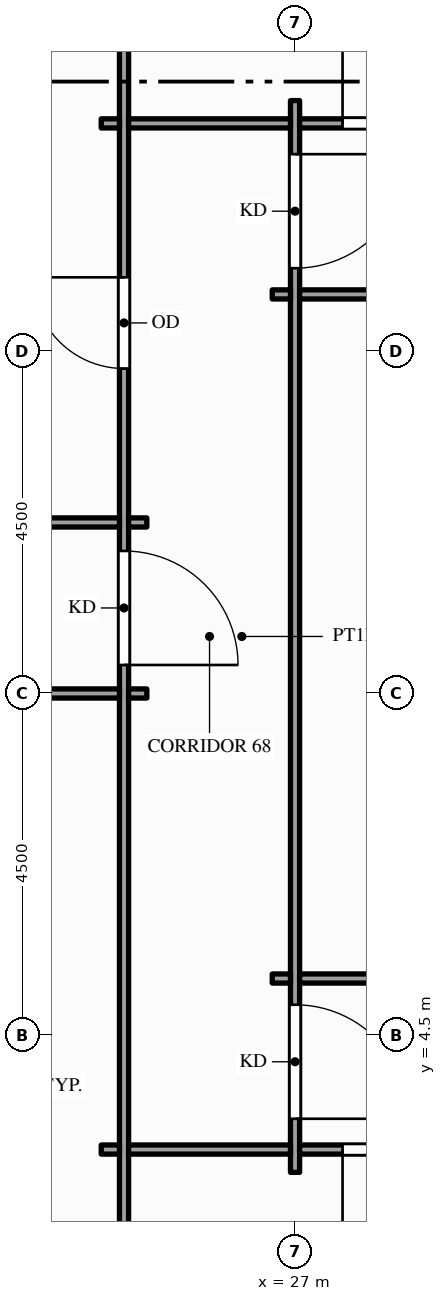
"""IFC4 building model, lengths in metres.
Left out: names, types, materials, properties, quantities, classifications, styles, units other than length and angle.
Written with IfcOpenShell. Run it as: python <this file> out.ifc"""

import sys

from ifc_helpers import new_model, si_unit, direction, frame, frame_2d, origin, place, context, subcontext, project, spatial, rectangle, extrude, element, fill, save


model = new_model("IFC4")
c1 = context("Model", 3, precision=1e-05, world=origin(), true_north=direction((0.0, 1.0)))
c2 = subcontext(c1, "Body", "Model", "MODEL_VIEW")
j1 = project(units=[si_unit("LENGTHUNIT", "METRE"), si_unit("PLANEANGLEUNIT", "RADIAN")], contexts=[c1])
p1 = place(None, origin())
s1 = spatial("IfcSite", under=j1, at=p1, CompositionType="ELEMENT")
p2 = place(p1, origin())
s2 = spatial("IfcBuilding", under=s1, at=p2, CompositionType="ELEMENT")
p3 = place(p2, frame((0.0, 0.0, 199.0)))
s3 = spatial("IfcBuildingStorey", under=s2, at=p3, CompositionType="ELEMENT", Elevation=199.0)
p4 = place(p3, frame((24.75, -1.35, 0.0), z_axis=(0.0, 0.0, 1.0), x_axis=(0.0, 1.0, 0.0)))
e1 = element("IfcWall", 1, at=p4, inside=s3, PredefinedType="PARTITIONING", context=c2, shape_type="SweptSolid", body=[
    extrude(rectangle(XDim=24.101, YDim=0.12, at=frame_2d((12.05, 0.0))), origin(), (0.0, 0.0, 1.0), 2.76),
])
p5 = place(p4, frame((10.725, 0.0, 0.0)))
e2 = element("IfcOpeningElement", 2, at=p5, cuts=e1, PredefinedType="OPENING", context=c2, shape_type="SweptSolid", body=[
    extrude(rectangle(XDim=1.5, YDim=2.1, at=frame_2d((0.75, 1.05))), frame((0.0, 0.07, 0.0), z_axis=(0.0, -1.0, 0.0), x_axis=(1.0, 0.0, 0.0)), (0.0, 0.0, 1.0), 0.14),
])
p6 = place(p4, frame((14.625, 0.0, 0.0)))
e3 = element("IfcOpeningElement", 3, at=p6, cuts=e1, PredefinedType="OPENING", context=c2, shape_type="SweptSolid", body=[
    extrude(rectangle(XDim=1.2, YDim=2.1, at=frame_2d((0.6, 1.05))), frame((0.0, 0.07, 0.0), z_axis=(0.0, -1.0, 0.0), x_axis=(1.0, 0.0, 0.0)), (0.0, 0.0, 1.0), 0.14),
])
p7 = place(p3, frame((27.0, 2.7, 0.0), z_axis=(0.0, 0.0, 1.0), x_axis=(0.0, 1.0, 0.0)))
e4 = element("IfcWall", 4, at=p7, inside=s3, PredefinedType="PARTITIONING", context=c2, shape_type="SweptSolid", body=[
    extrude(rectangle(XDim=14.1, YDim=0.12, at=frame_2d((7.05, 0.0))), origin(), (0.0, 0.0, 1.0), 2.87),
])
p8 = place(p7, frame((0.705, 0.0, 0.0)))
e5 = element("IfcOpeningElement", 5, at=p8, cuts=e4, PredefinedType="OPENING", context=c2, shape_type="SweptSolid", body=[
    extrude(rectangle(XDim=1.5, YDim=2.1, at=frame_2d((0.75, 1.05))), frame((0.0, 0.07, 0.0), z_axis=(0.0, -1.0, 0.0), x_axis=(1.0, 0.0, 0.0)), (0.0, 0.0, 1.0), 0.14),
])
p9 = place(p7, frame((11.895, 0.0, 0.0)))
e6 = element("IfcOpeningElement", 6, at=p9, cuts=e4, PredefinedType="OPENING", context=c2, shape_type="SweptSolid", body=[
    extrude(rectangle(XDim=1.5, YDim=2.1, at=frame_2d((0.75, 1.05))), frame((0.0, 0.07, 0.0), z_axis=(0.0, -1.0, 0.0), x_axis=(1.0, 0.0, 0.0)), (0.0, 0.0, 1.0), 0.14),
])
p10 = place(p3, frame((24.45, 3.0, 0.0), z_axis=(0.0, 0.0, 1.0), x_axis=(1.0, 0.0, 0.0)))
e7 = element("IfcWall", 7, at=p10, inside=s3, PredefinedType="PARTITIONING", context=c2, shape_type="SweptSolid", body=[
    extrude(rectangle(XDim=0.24, YDim=0.12, at=frame_2d((0.12, 0.0))), origin(), (0.0, 0.0, 1.0), 2.76),
])
p11 = place(p3, frame((24.81, 3.0, 0.0), z_axis=(0.0, 0.0, 1.0), x_axis=(1.0, 0.0, 0.0)))
e8 = element("IfcWall", 8, at=p11, inside=s3, PredefinedType="PARTITIONING", context=c2, shape_type="SweptSolid", body=[
    extrude(rectangle(XDim=2.13, YDim=0.12, at=frame_2d((1.065, 0.0))), origin(), (0.0, 0.0, 1.0), 2.76),
])
p12 = place(p3, frame((27.06, 3.0, 0.0), z_axis=(0.0, 0.0, 1.0), x_axis=(1.0, 0.0, 0.0)))
e9 = element("IfcWall", 9, at=p12, inside=s3, PredefinedType="PARTITIONING", context=c2, shape_type="SweptSolid", body=[
    extrude(rectangle(XDim=2.13, YDim=0.12, at=frame_2d((1.065, 0.0))), origin(), (0.0, 0.0, 1.0), 2.87),
])
p13 = place(p12, frame((0.565, 0.0, 0.0)))
e10 = element("IfcOpeningElement", 10, at=p13, cuts=e9, PredefinedType="OPENING", context=c2, shape_type="SweptSolid", body=[
    extrude(rectangle(XDim=1.0, YDim=2.1, at=frame_2d((0.5, 1.05))), frame((0.0, 0.07, 0.0), z_axis=(0.0, -1.0, 0.0), x_axis=(1.0, 0.0, 0.0)), (0.0, 0.0, 1.0), 0.14),
])
p14 = place(p3, frame((26.7, 5.25, 0.0), z_axis=(0.0, 0.0, 1.0), x_axis=(1.0, 0.0, 0.0)))
e11 = element("IfcWall", 11, at=p14, inside=s3, PredefinedType="PARTITIONING", context=c2, shape_type="SweptSolid", body=[
    extrude(rectangle(XDim=0.24, YDim=0.12, at=frame_2d((0.12, 0.0))), origin(), (0.0, 0.0, 1.0), 2.87),
])
p15 = place(p3, frame((27.06, 5.25, 0.0), z_axis=(0.0, 0.0, 1.0), x_axis=(1.0, 0.0, 0.0)))
e12 = element("IfcWall", 12, at=p15, inside=s3, PredefinedType="PARTITIONING", context=c2, shape_type="SweptSolid", body=[
    extrude(rectangle(XDim=8.88, YDim=0.12, at=frame_2d((4.44, 0.0))), origin(), (0.0, 0.0, 1.0), 2.87),
])
p16 = place(p15, frame((3.54, 0.0, 0.0)))
e13 = element("IfcOpeningElement", 13, at=p16, cuts=e12, PredefinedType="OPENING", context=c2, shape_type="SweptSolid", body=[
    extrude(rectangle(XDim=1.8, YDim=2.1, at=frame_2d((0.9, 1.05))), frame((0.0, 0.07, 0.0), z_axis=(0.0, -1.0, 0.0), x_axis=(1.0, 0.0, 0.0)), (0.0, 0.0, 1.0), 0.14),
])
p17 = place(p3, frame((18.06, 9.0, 0.0), z_axis=(0.0, 0.0, 1.0), x_axis=(1.0, 0.0, 0.0)))
e14 = element("IfcWall", 14, at=p17, inside=s3, PredefinedType="PARTITIONING", context=c2, shape_type="SweptSolid", body=[
    extrude(rectangle(XDim=6.63, YDim=0.12, at=frame_2d((3.315, 0.0))), origin(), (0.0, 0.0, 1.0), 2.76),
])
p18 = place(p17, frame((2.715, 0.0, 0.0)))
e15 = element("IfcOpeningElement", 15, at=p18, cuts=e14, PredefinedType="OPENING", context=c2, shape_type="SweptSolid", body=[
    extrude(rectangle(XDim=1.2, YDim=2.1, at=frame_2d((0.6, 1.05))), frame((0.0, 0.07, 0.0), z_axis=(0.0, -1.0, 0.0), x_axis=(1.0, 0.0, 0.0)), (0.0, 0.0, 1.0), 0.14),
])
p19 = place(p3, frame((24.81, 9.0, 0.0), z_axis=(0.0, 0.0, 1.0), x_axis=(1.0, 0.0, 0.0)))
e16 = element("IfcWall", 16, at=p19, inside=s3, PredefinedType="PARTITIONING", context=c2, shape_type="SweptSolid", body=[
    extrude(rectangle(XDim=0.24, YDim=0.12, at=frame_2d((0.12, 0.0))), origin(), (0.0, 0.0, 1.0), 2.76),
])
p20 = place(p3, frame((11.31, 11.25, 0.0), z_axis=(0.0, 0.0, 1.0), x_axis=(1.0, 0.0, 0.0)))
e17 = element("IfcWall", 17, at=p20, inside=s3, PredefinedType="PARTITIONING", context=c2, shape_type="SweptSolid", body=[
    extrude(rectangle(XDim=13.38, YDim=0.12, at=frame_2d((6.69, 0.0))), origin(), (0.0, 0.0, 1.0), 2.76),
])
p21 = place(p20, frame((3.54, 0.0, 0.0)))
e18 = element("IfcOpeningElement", 18, at=p21, cuts=e17, PredefinedType="OPENING", context=c2, shape_type="SweptSolid", body=[
    extrude(rectangle(XDim=1.8, YDim=2.1, at=frame_2d((0.9, 1.05))), frame((0.0, 0.07, 0.0), z_axis=(0.0, -1.0, 0.0), x_axis=(1.0, 0.0, 0.0)), (0.0, 0.0, 1.0), 0.14),
])
p22 = place(p3, frame((24.81, 11.25, 0.0), z_axis=(0.0, 0.0, 1.0), x_axis=(1.0, 0.0, 0.0)))
e19 = element("IfcWall", 19, at=p22, inside=s3, PredefinedType="PARTITIONING", context=c2, shape_type="SweptSolid", body=[
    extrude(rectangle(XDim=0.24, YDim=0.12, at=frame_2d((0.12, 0.0))), origin(), (0.0, 0.0, 1.0), 2.76),
])
p23 = place(p3, frame((26.7, 14.25, 0.0), z_axis=(0.0, 0.0, 1.0), x_axis=(1.0, 0.0, 0.0)))
e20 = element("IfcWall", 20, at=p23, inside=s3, PredefinedType="PARTITIONING", context=c2, shape_type="SweptSolid", body=[
    extrude(rectangle(XDim=0.24, YDim=0.12, at=frame_2d((0.12, 0.0))), origin(), (0.0, 0.0, 1.0), 2.87),
])
p24 = place(p3, frame((27.06, 14.25, 0.0), z_axis=(0.0, 0.0, 1.0), x_axis=(1.0, 0.0, 0.0)))
e21 = element("IfcWall", 21, at=p24, inside=s3, PredefinedType="PARTITIONING", context=c2, shape_type="SweptSolid", body=[
    extrude(rectangle(XDim=8.88, YDim=0.12, at=frame_2d((4.44, 0.0))), origin(), (0.0, 0.0, 1.0), 2.87),
])
p25 = place(p3, frame((24.45, 16.5, 0.0), z_axis=(0.0, 0.0, 1.0), x_axis=(1.0, 0.0, 0.0)))
e22 = element("IfcWall", 22, at=p25, inside=s3, PredefinedType="PARTITIONING", context=c2, shape_type="SweptSolid", body=[
    extrude(rectangle(XDim=0.24, YDim=0.12, at=frame_2d((0.12, 0.0))), origin(), (0.0, 0.0, 1.0), 2.76),
])
p26 = place(p3, frame((24.81, 16.5, 0.0), z_axis=(0.0, 0.0, 1.0), x_axis=(1.0, 0.0, 0.0)))
e23 = element("IfcWall", 23, at=p26, inside=s3, PredefinedType="PARTITIONING", context=c2, shape_type="SweptSolid", body=[
    extrude(rectangle(XDim=2.13, YDim=0.12, at=frame_2d((1.065, 0.0))), origin(), (0.0, 0.0, 1.0), 2.76),
])
p27 = place(p3, frame((27.06, 16.5, 0.0), z_axis=(0.0, 0.0, 1.0), x_axis=(1.0, 0.0, 0.0)))
e24 = element("IfcWall", 24, at=p27, inside=s3, PredefinedType="PARTITIONING", context=c2, shape_type="SweptSolid", body=[
    extrude(rectangle(XDim=2.13, YDim=0.12, at=frame_2d((1.065, 0.0))), origin(), (0.0, 0.0, 1.0), 2.87),
])
p28 = place(p27, frame((0.565, 0.0, 0.0)))
e25 = element("IfcOpeningElement", 25, at=p28, cuts=e24, PredefinedType="OPENING", context=c2, shape_type="SweptSolid", body=[
    extrude(rectangle(XDim=1.0, YDim=2.1, at=frame_2d((0.5, 1.05))), frame((0.0, 0.07, 0.0), z_axis=(0.0, -1.0, 0.0), x_axis=(1.0, 0.0, 0.0)), (0.0, 0.0, 1.0), 0.14),
])
p29 = place(p5, origin())
e26 = element("IfcDoor", 26, at=p29, inside=s3, OperationType="SINGLE_SWING_LEFT", PredefinedType="DOOR", context=c2, shape_type="SweptSolid", body=[
    extrude(rectangle(XDim=1.5, YDim=2.1, at=frame_2d((0.75, 1.05))), frame((0.0, 0.025, 0.0), z_axis=(0.0, -1.0, 0.0), x_axis=(1.0, 0.0, 0.0)), (0.0, 0.0, 1.0), 0.05),
])
fill(e2, e26)
p30 = place(p8, origin())
e27 = element("IfcDoor", 27, at=p30, inside=s3, OperationType="SINGLE_SWING_LEFT", PredefinedType="DOOR", context=c2, shape_type="SweptSolid", body=[
    extrude(rectangle(XDim=1.5, YDim=2.1, at=frame_2d((0.75, 1.05))), frame((0.0, 0.025, 0.0), z_axis=(0.0, -1.0, 0.0), x_axis=(1.0, 0.0, 0.0)), (0.0, 0.0, 1.0), 0.05),
])
fill(e5, e27)
p31 = place(p9, origin())
e28 = element("IfcDoor", 28, at=p31, inside=s3, OperationType="SINGLE_SWING_RIGHT", PredefinedType="DOOR", context=c2, shape_type="SweptSolid", body=[
    extrude(rectangle(XDim=1.5, YDim=2.1, at=frame_2d((0.75, 1.05))), frame((0.0, 0.025, 0.0), z_axis=(0.0, -1.0, 0.0), x_axis=(1.0, 0.0, 0.0)), (0.0, 0.0, 1.0), 0.05),
])
fill(e6, e28)
p32 = place(p13, origin())
e29 = element("IfcDoor", 29, at=p32, inside=s3, OperationType="SINGLE_SWING_LEFT", PredefinedType="DOOR", context=c2, shape_type="SweptSolid", body=[
    extrude(rectangle(XDim=1.0, YDim=2.1, at=frame_2d((0.5, 1.05))), frame((0.0, 0.025, 0.0), z_axis=(0.0, -1.0, 0.0), x_axis=(1.0, 0.0, 0.0)), (0.0, 0.0, 1.0), 0.05),
])
fill(e10, e29)
p33 = place(p28, origin())
e30 = element("IfcDoor", 30, at=p33, inside=s3, OperationType="SINGLE_SWING_LEFT", PredefinedType="DOOR", context=c2, shape_type="SweptSolid", body=[
    extrude(rectangle(XDim=1.0, YDim=2.1, at=frame_2d((0.5, 1.05))), frame((0.0, 0.025, 0.0), z_axis=(0.0, -1.0, 0.0), x_axis=(1.0, 0.0, 0.0)), (0.0, 0.0, 1.0), 0.05),
])
fill(e25, e30)
p34 = place(p6, origin())
e31 = element("IfcDoor", 31, at=p34, inside=s3, OperationType="SINGLE_SWING_RIGHT", PredefinedType="DOOR", context=c2, shape_type="SweptSolid", body=[
    extrude(rectangle(XDim=1.2, YDim=2.1, at=frame_2d((0.6, 1.05))), frame((0.0, 0.025, 0.0), z_axis=(0.0, -1.0, 0.0), x_axis=(1.0, 0.0, 0.0)), (0.0, 0.0, 1.0), 0.05),
])
fill(e3, e31)
save(model, sys.argv[1])
